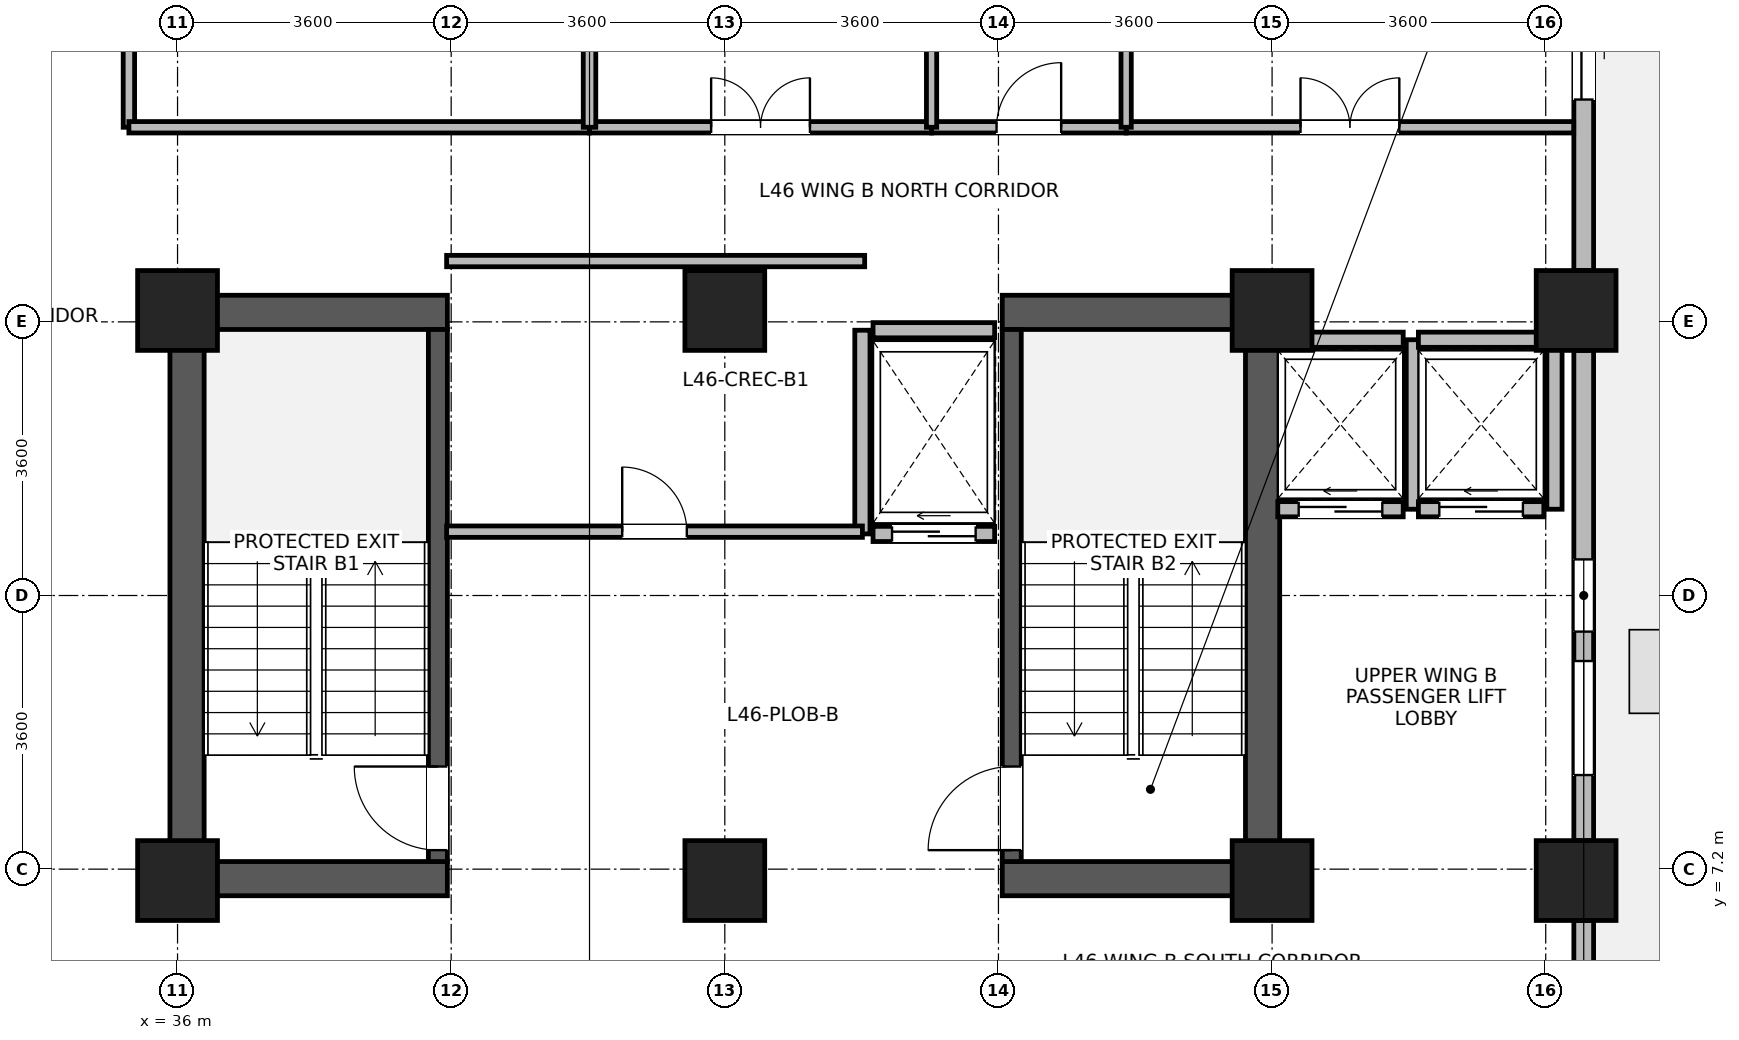
"""IFC4 building model, lengths in metres.
Left out: names, types, materials, properties, quantities, classifications, styles, units other than length and angle.
Written with IfcOpenShell. Run it as: python <this file> out.ifc"""

import sys

from ifc_helpers import new_model, si_unit, direction, frame, frame_2d, origin, origin_2d, place, context, subcontext, project, spatial, rectangle, extrude, source, transform, mapped, element, fill, save


model = new_model("IFC4")
c1 = context("Model", 3, precision=1e-05, world=origin(), true_north=direction((0.0, 1.0)))
c2 = subcontext(c1, "Body", "Model", "MODEL_VIEW")
j1 = project(units=[si_unit("LENGTHUNIT", "METRE"), si_unit("PLANEANGLEUNIT", "RADIAN")], contexts=[c1])
p1 = place(None, origin())
s1 = spatial("IfcSite", under=j1, at=p1, CompositionType="ELEMENT")
p2 = place(p1, origin())
s2 = spatial("IfcBuilding", under=s1, at=p2, CompositionType="ELEMENT")
p3 = place(p2, frame((0.0, 0.0, 180.9)))
s3 = spatial("IfcBuildingStorey", under=s2, at=p3, CompositionType="ELEMENT", Elevation=180.9)
for number, where, z_axis, x_axis in (
    (1, (36.125, 6.85, 0.0), (0.0, 0.0, 1.0), (0.0, 1.0, 0.0)),
    (2, (50.275, 6.85, 0.0), (0.0, 0.0, 1.0), (0.0, 1.0, 0.0)),
):
    element("IfcWall", number, at=place(p3, frame(where, z_axis=z_axis, x_axis=x_axis)), inside=s3, PredefinedType="SHEAR", context=c2, shape_type="SweptSolid", body=[
        extrude(rectangle(XDim=7.9, YDim=0.45, at=frame_2d((3.95, 0.0))), origin(), (0.0, 0.0, 1.0), 3.46),
    ])
for number, where, z_axis, x_axis in (
    (3, (36.35, 7.075, 0.0), (0.0, 0.0, 1.0), (1.0, 0.0, 0.0)),
    (4, (46.85, 7.075, 0.0), (0.0, 0.0, 1.0), (1.0, 0.0, 0.0)),
    (5, (36.35, 14.525, 0.0), (0.0, 0.0, 1.0), (1.0, 0.0, 0.0)),
    (6, (46.85, 14.525, 0.0), (0.0, 0.0, 1.0), (1.0, 0.0, 0.0)),
):
    element("IfcWall", number, at=place(p3, frame(where, z_axis=z_axis, x_axis=x_axis)), inside=s3, PredefinedType="SHEAR", context=c2, shape_type="SweptSolid", body=[
        extrude(rectangle(XDim=3.2, YDim=0.45, at=frame_2d((1.6, 0.0))), origin(), (0.0, 0.0, 1.0), 3.46),
    ])
p4 = place(p3, frame((39.425, 7.3, 0.0), z_axis=(0.0, 0.0, 1.0), x_axis=(0.0, 1.0, 0.0)))
e7 = element("IfcWall", 7, at=p4, inside=s3, PredefinedType="SHEAR", context=c2, shape_type="SweptSolid", body=[
    extrude(rectangle(XDim=7.0, YDim=0.25, at=frame_2d((3.5, 0.0))), origin(), (0.0, 0.0, 1.0), 3.46),
])
p5 = place(p4, frame((0.15, 0.0, 0.0)))
e8 = element("IfcOpeningElement", 8, at=p5, cuts=e7, PredefinedType="OPENING", context=c2, shape_type="SweptSolid", body=[
    extrude(rectangle(XDim=1.1, YDim=2.08, at=frame_2d((0.55, 1.04))), frame((0.0, 0.135, 0.0), z_axis=(0.0, -1.0, 0.0), x_axis=(1.0, 0.0, 0.0)), (0.0, 0.0, 1.0), 0.27),
])
p6 = place(p3, frame((46.975, 7.3, 0.0), z_axis=(0.0, 0.0, 1.0), x_axis=(0.0, 1.0, 0.0)))
e9 = element("IfcWall", 9, at=p6, inside=s3, PredefinedType="SHEAR", context=c2, shape_type="SweptSolid", body=[
    extrude(rectangle(XDim=7.0, YDim=0.25, at=frame_2d((3.5, 0.0))), origin(), (0.0, 0.0, 1.0), 3.46),
])
p7 = place(p6, frame((0.15, 0.0, 0.0)))
e10 = element("IfcOpeningElement", 10, at=p7, cuts=e9, PredefinedType="OPENING", context=c2, shape_type="SweptSolid", body=[
    extrude(rectangle(XDim=1.1, YDim=2.08, at=frame_2d((0.55, 1.04))), frame((0.0, 0.135, 0.0), z_axis=(0.0, -1.0, 0.0), x_axis=(1.0, 0.0, 0.0)), (0.0, 0.0, 1.0), 0.27),
])
m1 = source(origin(), c2, "Body", "SweptSolid", [
    extrude(rectangle(XDim=1.05, YDim=1.05, at=origin_2d()), origin(), (0.0, 0.0, 1.0), 3.7),
])
for number, where, z_axis, x_axis in (
    (11, (36.0, 7.05, 0.0), (0.0, 0.0, 1.0), (1.0, 0.0, 0.0)),
    (12, (36.0, 14.55, 0.0), (0.0, 0.0, 1.0), (1.0, 0.0, 0.0)),
    (13, (43.2, 7.05, 0.0), (0.0, 0.0, 1.0), (1.0, 0.0, 0.0)),
    (14, (43.2, 14.55, 0.0), (0.0, 0.0, 1.0), (1.0, 0.0, 0.0)),
    (15, (50.4, 7.05, 0.0), (0.0, 0.0, 1.0), (1.0, 0.0, 0.0)),
    (16, (50.4, 14.55, 0.0), (0.0, 0.0, 1.0), (1.0, 0.0, 0.0)),
    (17, (54.4, 7.05, 0.0), (0.0, 0.0, 1.0), (1.0, 0.0, 0.0)),
    (18, (54.4, 14.55, 0.0), (0.0, 0.0, 1.0), (1.0, 0.0, 0.0)),
):
    element("IfcColumn", number, at=place(p3, frame(where, z_axis=z_axis, x_axis=x_axis)), inside=s3, PredefinedType="COLUMN", context=c2, shape_type="MappedRepresentation", body=[
        mapped(m1, transform((0.0, 0.0, 0.0), x_axis=(1.0, 0.0, 0.0), y_axis=(0.0, 1.0, 0.0), z_axis=(0.0, 0.0, 1.0), scale=1.0)),
    ])
p8 = place(p3, frame((54.5, 6.524, 0.0), z_axis=(0.0, 0.0, 1.0), x_axis=(0.0, -1.0, 0.0)))
e19 = element("IfcWall", 19, at=p8, inside=s3, PredefinedType="STANDARD", context=c2, shape_type="SweptSolid", body=[
    extrude(rectangle(XDim=1.854, YDim=0.26, at=frame_2d((0.927, 0.0))), origin(), (0.0, 0.0, 1.0), 3.44),
])
p9 = place(p3, frame((54.5, 14.024, 0.0), z_axis=(0.0, 0.0, 1.0), x_axis=(0.0, -1.0, 0.0)))
e20 = element("IfcWall", 20, at=p9, inside=s3, PredefinedType="STANDARD", context=c2, shape_type="SweptSolid", body=[
    extrude(rectangle(XDim=6.448, YDim=0.26, at=frame_2d((3.224, 0.0))), origin(), (0.0, 0.0, 1.0), 2.99),
])
p10 = place(p9, frame((4.086, 0.0, 0.85)))
e21 = element("IfcOpeningElement", 21, at=p10, cuts=e20, PredefinedType="OPENING", context=c2, shape_type="SweptSolid", body=[
    extrude(rectangle(XDim=1.5, YDim=1.85, at=frame_2d((0.75, 0.925))), frame((0.0, 0.14, 0.0), z_axis=(0.0, -1.0, 0.0), x_axis=(1.0, 0.0, 0.0)), (0.0, 0.0, 1.0), 0.28),
])
p11 = place(p9, frame((2.749, 0.0, 0.85)))
e22 = element("IfcOpeningElement", 22, at=p11, cuts=e20, PredefinedType="OPENING", context=c2, shape_type="SweptSolid", body=[
    extrude(rectangle(XDim=0.95, YDim=1.75, at=frame_2d((0.475, 0.875))), frame((0.0, 0.14, 0.0), z_axis=(0.0, -1.0, 0.0), x_axis=(1.0, 0.0, 0.0)), (0.0, 0.0, 1.0), 0.28),
])
p12 = place(p3, frame((54.5, 21.074, 0.0), z_axis=(0.0, 0.0, 1.0), x_axis=(0.0, -1.0, 0.0)))
e23 = element("IfcWall", 23, at=p12, inside=s3, PredefinedType="STANDARD", context=c2, shape_type="SweptSolid", body=[
    extrude(rectangle(XDim=5.998, YDim=0.26, at=frame_2d((2.999, 0.0))), origin(), (0.0, 0.0, 1.0), 2.99),
])
p13 = place(p12, frame((2.249, 0.0, 0.0)))
e24 = element("IfcOpeningElement", 24, at=p13, cuts=e23, PredefinedType="OPENING", context=c2, shape_type="SweptSolid", body=[
    extrude(rectangle(XDim=1.5, YDim=2.15, at=frame_2d((0.75, 1.075))), frame((0.0, 0.14, 0.0), z_axis=(0.0, -1.0, 0.0), x_axis=(1.0, 0.0, 0.0)), (0.0, 0.0, 1.0), 0.28),
])
p14 = place(p3, frame((50.475, 11.935, 0.0), z_axis=(0.0, 0.0, 1.0), x_axis=(1.0, 0.0, 0.0)))
e25 = element("IfcWall", 25, at=p14, inside=s3, PredefinedType="PARTITIONING", context=c2, shape_type="SweptSolid", body=[
    extrude(rectangle(XDim=1.65, YDim=0.2, at=frame_2d((0.825, 0.0))), origin(), (0.0, 0.0, 1.0), 3.44),
])
p15 = place(p14, frame((0.275, 0.0, 0.0)))
e26 = element("IfcOpeningElement", 26, at=p15, cuts=e25, PredefinedType="OPENING", context=c2, shape_type="SweptSolid", body=[
    extrude(rectangle(XDim=1.1, YDim=2.12, at=frame_2d((0.55, 1.06))), frame((0.0, 0.11, 0.0), z_axis=(0.0, -1.0, 0.0), x_axis=(1.0, 0.0, 0.0)), (0.0, 0.0, 1.0), 0.22),
])
p16 = place(p3, frame((50.475, 14.165, 0.0), z_axis=(0.0, 0.0, 1.0), x_axis=(1.0, 0.0, 0.0)))
e27 = element("IfcWall", 27, at=p16, inside=s3, PredefinedType="PARTITIONING", context=c2, shape_type="SweptSolid", body=[
    extrude(rectangle(XDim=1.65, YDim=0.2, at=frame_2d((0.825, 0.0))), origin(), (0.0, 0.0, 1.0), 3.44),
])
p17 = place(p3, frame((52.265, 11.935, 0.0), z_axis=(0.0, 0.0, 1.0), x_axis=(0.0, 1.0, 0.0)))
e28 = element("IfcWall", 28, at=p17, inside=s3, PredefinedType="PARTITIONING", context=c2, shape_type="SweptSolid", body=[
    extrude(rectangle(XDim=2.23, YDim=0.2, at=frame_2d((1.115, 0.0))), origin(), (0.0, 0.0, 1.0), 3.44),
])
p18 = place(p3, frame((52.325, 11.935, 0.0), z_axis=(0.0, 0.0, 1.0), x_axis=(1.0, 0.0, 0.0)))
e29 = element("IfcWall", 29, at=p18, inside=s3, PredefinedType="PARTITIONING", context=c2, shape_type="SweptSolid", body=[
    extrude(rectangle(XDim=1.65, YDim=0.2, at=frame_2d((0.825, 0.0))), origin(), (0.0, 0.0, 1.0), 3.44),
])
p19 = place(p18, frame((0.275, 0.0, 0.0)))
e30 = element("IfcOpeningElement", 30, at=p19, cuts=e29, PredefinedType="OPENING", context=c2, shape_type="SweptSolid", body=[
    extrude(rectangle(XDim=1.1, YDim=2.12, at=frame_2d((0.55, 1.06))), frame((0.0, 0.11, 0.0), z_axis=(0.0, -1.0, 0.0), x_axis=(1.0, 0.0, 0.0)), (0.0, 0.0, 1.0), 0.22),
])
p20 = place(p3, frame((52.325, 14.165, 0.0), z_axis=(0.0, 0.0, 1.0), x_axis=(1.0, 0.0, 0.0)))
e31 = element("IfcWall", 31, at=p20, inside=s3, PredefinedType="PARTITIONING", context=c2, shape_type="SweptSolid", body=[
    extrude(rectangle(XDim=1.65, YDim=0.2, at=frame_2d((0.825, 0.0))), origin(), (0.0, 0.0, 1.0), 3.44),
])
p21 = place(p3, frame((54.115, 11.935, 0.0), z_axis=(0.0, 0.0, 1.0), x_axis=(0.0, 1.0, 0.0)))
e32 = element("IfcWall", 32, at=p21, inside=s3, PredefinedType="PARTITIONING", context=c2, shape_type="SweptSolid", body=[
    extrude(rectangle(XDim=2.23, YDim=0.2, at=frame_2d((1.115, 0.0))), origin(), (0.0, 0.0, 1.0), 2.99),
])
p22 = place(p3, frame((45.15, 11.61, 0.0), z_axis=(0.0, 0.0, 1.0), x_axis=(1.0, 0.0, 0.0)))
e33 = element("IfcWall", 33, at=p22, inside=s3, PredefinedType="PARTITIONING", context=c2, shape_type="SweptSolid", body=[
    extrude(rectangle(XDim=1.6, YDim=0.2, at=frame_2d((0.8, 0.0))), origin(), (0.0, 0.0, 1.0), 3.44),
])
p23 = place(p22, frame((0.25, 0.0, 0.0)))
e34 = element("IfcOpeningElement", 34, at=p23, cuts=e33, PredefinedType="OPENING", context=c2, shape_type="SweptSolid", body=[
    extrude(rectangle(XDim=1.1, YDim=2.12, at=frame_2d((0.55, 1.06))), frame((0.0, 0.11, 0.0), z_axis=(0.0, -1.0, 0.0), x_axis=(1.0, 0.0, 0.0)), (0.0, 0.0, 1.0), 0.22),
])
p24 = place(p3, frame((45.15, 14.29, 0.0), z_axis=(0.0, 0.0, 1.0), x_axis=(1.0, 0.0, 0.0)))
e35 = element("IfcWall", 35, at=p24, inside=s3, PredefinedType="PARTITIONING", context=c2, shape_type="SweptSolid", body=[
    extrude(rectangle(XDim=1.6, YDim=0.2, at=frame_2d((0.8, 0.0))), origin(), (0.0, 0.0, 1.0), 2.44),
])
p25 = place(p3, frame((45.01, 11.61, 0.0), z_axis=(0.0, 0.0, 1.0), x_axis=(0.0, 1.0, 0.0)))
e36 = element("IfcWall", 36, at=p25, inside=s3, PredefinedType="PARTITIONING", context=c2, shape_type="SweptSolid", body=[
    extrude(rectangle(XDim=2.68, YDim=0.2, at=frame_2d((1.34, 0.0))), origin(), (0.0, 0.0, 1.0), 3.44),
])
p26 = place(p3, frame((35.36, 16.96, 0.0), z_axis=(0.0, 0.0, 1.0), x_axis=(0.0, 1.0, 0.0)))
e37 = element("IfcWall", 37, at=p26, inside=s3, PredefinedType="PARTITIONING", context=c2, shape_type="SweptSolid", body=[
    extrude(rectangle(XDim=9.64, YDim=0.15, at=frame_2d((4.82, 0.0))), origin(), (0.0, 0.0, 1.0), 3.44),
])
p27 = place(p26, frame((2.435, 0.0, 0.0)))
e38 = element("IfcOpeningElement", 38, at=p27, cuts=e37, PredefinedType="OPENING", context=c2, shape_type="SweptSolid", body=[
    extrude(rectangle(XDim=1.3, YDim=2.12, at=frame_2d((0.65, 1.06))), frame((0.0, 0.085, 0.0), z_axis=(0.0, -1.0, 0.0), x_axis=(1.0, 0.0, 0.0)), (0.0, 0.0, 1.0), 0.17),
])
p28 = place(p3, frame((35.36, 16.96, 0.0), z_axis=(0.0, 0.0, 1.0), x_axis=(1.0, 0.0, 0.0)))
e39 = element("IfcWall", 39, at=p28, inside=s3, PredefinedType="PARTITIONING", context=c2, shape_type="SweptSolid", body=[
    extrude(rectangle(XDim=6.06, YDim=0.15, at=frame_2d((3.03, 0.0))), origin(), (0.0, 0.0, 1.0), 3.44),
])
p29 = place(p3, frame((48.48, 16.96, 0.0), z_axis=(0.0, 0.0, 1.0), x_axis=(1.0, 0.0, 0.0)))
e40 = element("IfcWall", 40, at=p29, inside=s3, PredefinedType="PARTITIONING", context=c2, shape_type="SweptSolid", body=[
    extrude(rectangle(XDim=5.888, YDim=0.15, at=frame_2d((2.944, 0.0))), origin(), (0.0, 0.0, 1.0), 3.44),
])
p30 = place(p29, frame((2.294, 0.0, 0.0)))
e41 = element("IfcOpeningElement", 41, at=p30, cuts=e40, PredefinedType="OPENING", context=c2, shape_type="SweptSolid", body=[
    extrude(rectangle(XDim=1.3, YDim=2.12, at=frame_2d((0.65, 1.06))), frame((0.0, 0.085, 0.0), z_axis=(0.0, -1.0, 0.0), x_axis=(1.0, 0.0, 0.0)), (0.0, 0.0, 1.0), 0.17),
])
p31 = place(p3, frame((39.54, 11.64, 0.0), z_axis=(0.0, 0.0, 1.0), x_axis=(1.0, 0.0, 0.0)))
e42 = element("IfcWall", 42, at=p31, inside=s3, PredefinedType="PARTITIONING", context=c2, shape_type="SweptSolid", body=[
    extrude(rectangle(XDim=5.47, YDim=0.15, at=frame_2d((2.735, 0.0))), origin(), (0.0, 0.0, 1.0), 3.44),
])
p32 = place(p31, frame((2.31, 0.0, 0.0)))
e43 = element("IfcOpeningElement", 43, at=p32, cuts=e42, PredefinedType="OPENING", context=c2, shape_type="SweptSolid", body=[
    extrude(rectangle(XDim=0.85, YDim=2.04, at=frame_2d((0.425, 1.02))), frame((0.0, 0.085, 0.0), z_axis=(0.0, -1.0, 0.0), x_axis=(1.0, 0.0, 0.0)), (0.0, 0.0, 1.0), 0.17),
])
p33 = place(p3, frame((39.54, 15.2, 0.0), z_axis=(0.0, 0.0, 1.0), x_axis=(1.0, 0.0, 0.0)))
e44 = element("IfcWall", 44, at=p33, inside=s3, PredefinedType="PARTITIONING", context=c2, shape_type="SweptSolid", body=[
    extrude(rectangle(XDim=5.5, YDim=0.15, at=frame_2d((2.75, 0.0))), origin(), (0.0, 0.0, 1.0), 3.44),
])
p34 = place(p3, frame((41.42, 16.96, 0.0), z_axis=(0.0, 0.0, 1.0), x_axis=(1.0, 0.0, 0.0)))
e45 = element("IfcWall", 45, at=p34, inside=s3, PredefinedType="PARTITIONING", context=c2, shape_type="SweptSolid", body=[
    extrude(rectangle(XDim=4.5, YDim=0.15, at=frame_2d((2.25, 0.0))), origin(), (0.0, 0.0, 1.0), 3.44),
])
p35 = place(p34, frame((1.6, 0.0, 0.0)))
e46 = element("IfcOpeningElement", 46, at=p35, cuts=e45, PredefinedType="OPENING", context=c2, shape_type="SweptSolid", body=[
    extrude(rectangle(XDim=1.3, YDim=2.12, at=frame_2d((0.65, 1.06))), frame((0.0, 0.085, 0.0), z_axis=(0.0, -1.0, 0.0), x_axis=(1.0, 0.0, 0.0)), (0.0, 0.0, 1.0), 0.17),
])
p36 = place(p3, frame((45.92, 16.96, 0.0), z_axis=(0.0, 0.0, 1.0), x_axis=(1.0, 0.0, 0.0)))
e47 = element("IfcWall", 47, at=p36, inside=s3, PredefinedType="PARTITIONING", context=c2, shape_type="SweptSolid", body=[
    extrude(rectangle(XDim=2.56, YDim=0.15, at=frame_2d((1.28, 0.0))), origin(), (0.0, 0.0, 1.0), 3.44),
])
p37 = place(p36, frame((0.855, 0.0, 0.0)))
e48 = element("IfcOpeningElement", 48, at=p37, cuts=e47, PredefinedType="OPENING", context=c2, shape_type="SweptSolid", body=[
    extrude(rectangle(XDim=0.85, YDim=2.04, at=frame_2d((0.425, 1.02))), frame((0.0, 0.085, 0.0), z_axis=(0.0, -1.0, 0.0), x_axis=(1.0, 0.0, 0.0)), (0.0, 0.0, 1.0), 0.17),
])
p38 = place(p3, frame((41.42, 16.96, 0.0), z_axis=(0.0, 0.0, 1.0), x_axis=(0.0, 1.0, 0.0)))
e49 = element("IfcWall", 49, at=p38, inside=s3, PredefinedType="PARTITIONING", context=c2, shape_type="SweptSolid", body=[
    extrude(rectangle(XDim=9.64, YDim=0.165, at=frame_2d((4.82, 0.0))), origin(), (0.0, 0.0, 1.0), 3.44),
])
for number, where, z_axis, x_axis in (
    (50, (45.92, 16.96, 0.0), (0.0, 0.0, 1.0), (0.0, 1.0, 0.0)),
    (51, (48.48, 16.96, 0.0), (0.0, 0.0, 1.0), (0.0, 1.0, 0.0)),
):
    element("IfcWall", number, at=place(p3, frame(where, z_axis=z_axis, x_axis=x_axis)), inside=s3, PredefinedType="PARTITIONING", context=c2, shape_type="SweptSolid", body=[
        extrude(rectangle(XDim=9.64, YDim=0.135, at=frame_2d((4.82, 0.0))), origin(), (0.0, 0.0, 1.0), 3.44),
    ])
p39 = place(p10, origin())
e52 = element("IfcWindow", 52, at=p39, inside=s3, PartitioningType="SINGLE_PANEL", PredefinedType="WINDOW", context=c2, shape_type="SweptSolid", body=[
    extrude(rectangle(XDim=1.5, YDim=1.85, at=frame_2d((0.75, 0.925))), frame((0.0, 0.03, 0.0), z_axis=(0.0, -1.0, 0.0), x_axis=(1.0, 0.0, 0.0)), (0.0, 0.0, 1.0), 0.06),
])
fill(e21, e52)
p40 = place(p11, origin())
e53 = element("IfcWindow", 53, at=p40, inside=s3, PartitioningType="SINGLE_PANEL", PredefinedType="WINDOW", context=c2, shape_type="SweptSolid", body=[
    extrude(rectangle(XDim=0.95, YDim=1.75, at=frame_2d((0.475, 0.875))), frame((0.0, 0.03, 0.0), z_axis=(0.0, -1.0, 0.0), x_axis=(1.0, 0.0, 0.0)), (0.0, 0.0, 1.0), 0.06),
])
fill(e22, e53)
p41 = place(p13, origin())
e54 = element("IfcDoor", 54, at=p41, inside=s3, OperationType="SLIDING_TO_LEFT", PredefinedType="DOOR", context=c2, shape_type="SweptSolid", body=[
    extrude(rectangle(XDim=1.5, YDim=2.15, at=frame_2d((0.75, 1.075))), frame((0.0, 0.025, 0.0), z_axis=(0.0, -1.0, 0.0), x_axis=(1.0, 0.0, 0.0)), (0.0, 0.0, 1.0), 0.05),
])
fill(e24, e54)
p42 = place(p5, origin())
e55 = element("IfcDoor", 55, at=p42, inside=s3, OperationType="SINGLE_SWING_RIGHT", PredefinedType="DOOR", context=c2, shape_type="SweptSolid", body=[
    extrude(rectangle(XDim=1.1, YDim=2.08, at=frame_2d((0.55, 1.04))), frame((0.0, 0.025, 0.0), z_axis=(0.0, -1.0, 0.0), x_axis=(1.0, 0.0, 0.0)), (0.0, 0.0, 1.0), 0.05),
])
fill(e8, e55)
p43 = place(p7, origin())
e56 = element("IfcDoor", 56, at=p43, inside=s3, OperationType="SINGLE_SWING_LEFT", PredefinedType="DOOR", context=c2, shape_type="SweptSolid", body=[
    extrude(rectangle(XDim=1.1, YDim=2.08, at=frame_2d((0.55, 1.04))), frame((0.0, 0.025, 0.0), z_axis=(0.0, -1.0, 0.0), x_axis=(1.0, 0.0, 0.0)), (0.0, 0.0, 1.0), 0.05),
])
fill(e10, e56)
p44 = place(p15, origin())
e57 = element("IfcDoor", 57, at=p44, inside=s3, OperationType="SLIDING_TO_LEFT", PredefinedType="DOOR", context=c2, shape_type="SweptSolid", body=[
    extrude(rectangle(XDim=1.1, YDim=2.12, at=frame_2d((0.55, 1.06))), frame((0.0, 0.025, 0.0), z_axis=(0.0, -1.0, 0.0), x_axis=(1.0, 0.0, 0.0)), (0.0, 0.0, 1.0), 0.05),
])
fill(e26, e57)
p45 = place(p19, origin())
e58 = element("IfcDoor", 58, at=p45, inside=s3, OperationType="SLIDING_TO_LEFT", PredefinedType="DOOR", context=c2, shape_type="SweptSolid", body=[
    extrude(rectangle(XDim=1.1, YDim=2.12, at=frame_2d((0.55, 1.06))), frame((0.0, 0.025, 0.0), z_axis=(0.0, -1.0, 0.0), x_axis=(1.0, 0.0, 0.0)), (0.0, 0.0, 1.0), 0.05),
])
fill(e30, e58)
p46 = place(p23, origin())
e59 = element("IfcDoor", 59, at=p46, inside=s3, OperationType="SLIDING_TO_LEFT", PredefinedType="DOOR", context=c2, shape_type="SweptSolid", body=[
    extrude(rectangle(XDim=1.1, YDim=2.12, at=frame_2d((0.55, 1.06))), frame((0.0, 0.025, 0.0), z_axis=(0.0, -1.0, 0.0), x_axis=(1.0, 0.0, 0.0)), (0.0, 0.0, 1.0), 0.05),
])
fill(e34, e59)
p47 = place(p30, origin())
e60 = element("IfcDoor", 60, at=p47, inside=s3, OperationType="DOUBLE_DOOR_SINGLE_SWING", PredefinedType="DOOR", context=c2, shape_type="SweptSolid", body=[
    extrude(rectangle(XDim=1.3, YDim=2.12, at=frame_2d((0.65, 1.06))), frame((0.0, 0.025, 0.0), z_axis=(0.0, -1.0, 0.0), x_axis=(1.0, 0.0, 0.0)), (0.0, 0.0, 1.0), 0.05),
])
fill(e41, e60)
p48 = place(p32, origin())
e61 = element("IfcDoor", 61, at=p48, inside=s3, OperationType="SINGLE_SWING_LEFT", PredefinedType="DOOR", context=c2, shape_type="SweptSolid", body=[
    extrude(rectangle(XDim=0.85, YDim=2.04, at=frame_2d((0.425, 1.02))), frame((0.0, 0.025, 0.0), z_axis=(0.0, -1.0, 0.0), x_axis=(1.0, 0.0, 0.0)), (0.0, 0.0, 1.0), 0.05),
])
fill(e43, e61)
p49 = place(p35, origin())
e62 = element("IfcDoor", 62, at=p49, inside=s3, OperationType="DOUBLE_DOOR_SINGLE_SWING", PredefinedType="DOOR", context=c2, shape_type="SweptSolid", body=[
    extrude(rectangle(XDim=1.3, YDim=2.12, at=frame_2d((0.65, 1.06))), frame((0.0, 0.025, 0.0), z_axis=(0.0, -1.0, 0.0), x_axis=(1.0, 0.0, 0.0)), (0.0, 0.0, 1.0), 0.05),
])
fill(e46, e62)
p50 = place(p37, origin())
e63 = element("IfcDoor", 63, at=p50, inside=s3, OperationType="SINGLE_SWING_RIGHT", PredefinedType="DOOR", context=c2, shape_type="SweptSolid", body=[
    extrude(rectangle(XDim=0.85, YDim=2.04, at=frame_2d((0.425, 1.02))), frame((0.0, 0.025, 0.0), z_axis=(0.0, -1.0, 0.0), x_axis=(1.0, 0.0, 0.0)), (0.0, 0.0, 1.0), 0.05),
])
fill(e48, e63)
save(model, sys.argv[1])
